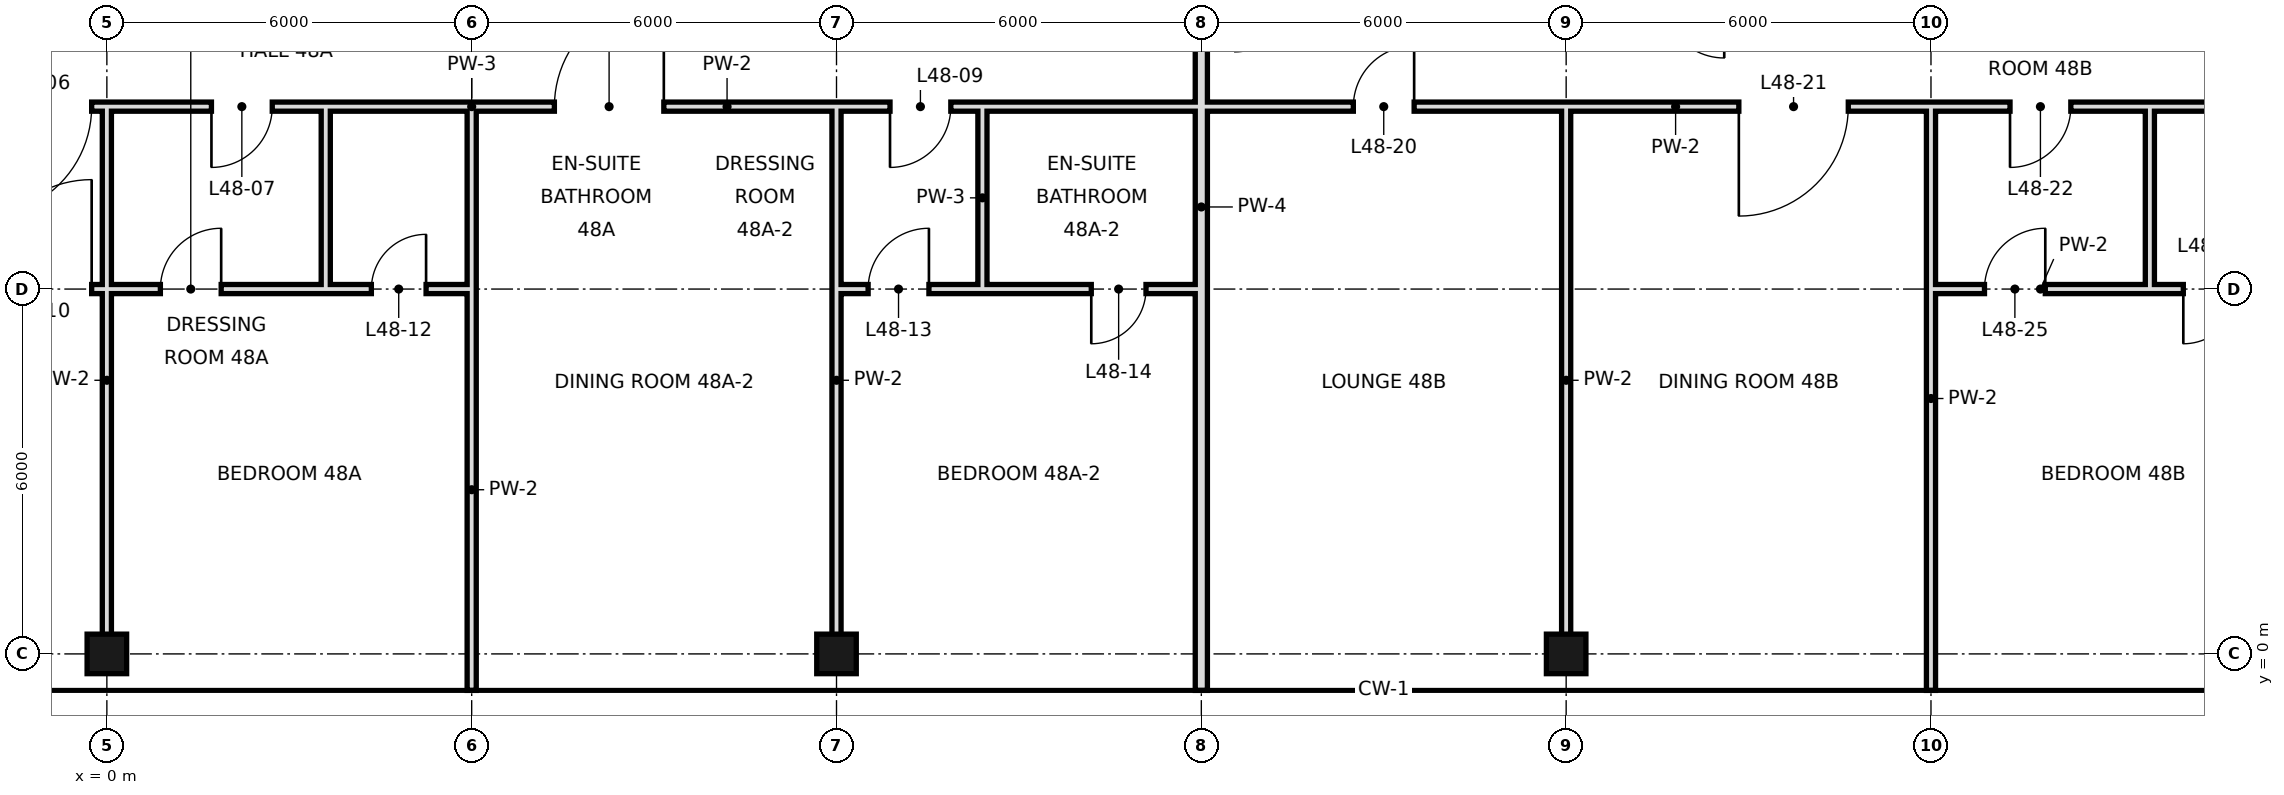
"""IFC4 building model, lengths in metres.
Left out: names, types, materials, properties, quantities, classifications, styles, units other than length and angle.
Written with IfcOpenShell. Run it as: python <this file> out.ifc"""

import sys

from ifc_helpers import new_model, si_unit, direction, frame, frame_2d, origin, origin_2d, place, context, subcontext, project, spatial, rectangle, hollow_rectangle, extrude, element, fill, save


model = new_model("IFC4")
c1 = context("Model", 3, precision=1e-05, world=origin(), true_north=direction((0.0, 1.0)))
c2 = subcontext(c1, "Body", "Model", "MODEL_VIEW")
j1 = project(units=[si_unit("LENGTHUNIT", "METRE"), si_unit("PLANEANGLEUNIT", "RADIAN")], contexts=[c1])
p1 = place(None, origin())
s1 = spatial("IfcSite", under=j1, at=p1, CompositionType="ELEMENT")
p2 = place(p1, origin())
s2 = spatial("IfcBuilding", under=s1, at=p2, CompositionType="ELEMENT")
p3 = place(p2, frame((0.0, 0.0, 206.4)))
s3 = spatial("IfcBuildingStorey", under=s2, at=p3, CompositionType="ELEMENT", Elevation=206.4)
for number, where, z_axis, x_axis in (
    (1, (0.0, 0.0, 0.0), (0.0, 0.0, 1.0), (1.0, 0.0, 0.0)),
    (2, (12.0, 0.0, 0.0), (0.0, 0.0, 1.0), (1.0, 0.0, 0.0)),
    (3, (24.0, 0.0, 0.0), (0.0, 0.0, 1.0), (1.0, 0.0, 0.0)),
):
    element("IfcColumn", number, at=place(p3, frame(where, z_axis=z_axis, x_axis=x_axis)), inside=s3, PredefinedType="COLUMN", context=c2, shape_type="SweptSolid", body=[
        extrude(hollow_rectangle(XDim=0.65, YDim=0.65, WallThickness=0.032, at=origin_2d()), origin(), (0.0, 0.0, 1.0), 3.6),
    ])
for number, where, z_axis, x_axis in (
    (4, (0.0, 0.0, 0.0), (0.0, 0.0, 1.0), (0.0, 1.0, 0.0)),
    (5, (12.0, 0.0, 0.0), (0.0, 0.0, 1.0), (0.0, 1.0, 0.0)),
):
    element("IfcWall", number, at=place(p3, frame(where, z_axis=z_axis, x_axis=x_axis)), inside=s3, PredefinedType="PARTITIONING", context=c2, shape_type="SweptSolid", body=[
        extrude(rectangle(XDim=9.0, YDim=0.15, at=frame_2d((4.5, 0.0))), origin(), (0.0, 0.0, 1.0), 2.68),
    ])
p4 = place(p3, frame((14.4, 6.0, 0.0), z_axis=(0.0, 0.0, 1.0), x_axis=(0.0, 1.0, 0.0)))
e6 = element("IfcWall", 6, at=p4, inside=s3, PredefinedType="PARTITIONING", context=c2, shape_type="SweptSolid", body=[
    extrude(rectangle(XDim=3.0, YDim=0.15, at=frame_2d((1.5, 0.0))), origin(), (0.0, 0.0, 1.0), 3.38),
])
p5 = place(p3, frame((18.0, -0.6, 0.0), z_axis=(0.0, 0.0, 1.0), x_axis=(0.0, 1.0, 0.0)))
e7 = element("IfcWall", 7, at=p5, inside=s3, PredefinedType="SOLIDWALL", context=c2, shape_type="SweptSolid", body=[
    extrude(rectangle(XDim=15.9, YDim=0.2, at=frame_2d((7.95, 0.0))), origin(), (0.0, 0.0, 1.0), 2.68),
])
p6 = place(p3, frame((24.0, 0.0, 0.0), z_axis=(0.0, 0.0, 1.0), x_axis=(0.0, 1.0, 0.0)))
e8 = element("IfcWall", 8, at=p6, inside=s3, PredefinedType="PARTITIONING", context=c2, shape_type="SweptSolid", body=[
    extrude(rectangle(XDim=9.0, YDim=0.15, at=frame_2d((4.5, 0.0))), origin(), (0.0, 0.0, 1.0), 2.68),
])
p7 = place(p3, frame((3.6, 6.0, 0.0), z_axis=(0.0, 0.0, 1.0), x_axis=(0.0, 1.0, 0.0)))
e9 = element("IfcWall", 9, at=p7, inside=s3, PredefinedType="PARTITIONING", context=c2, shape_type="SweptSolid", body=[
    extrude(rectangle(XDim=3.0, YDim=0.15, at=frame_2d((1.5, 0.0))), origin(), (0.0, 0.0, 1.0), 3.38),
])
p8 = place(p3, frame((30.0, -0.6, 0.0), z_axis=(0.0, 0.0, 1.0), x_axis=(0.0, 1.0, 0.0)))
e10 = element("IfcWall", 10, at=p8, inside=s3, PredefinedType="PARTITIONING", context=c2, shape_type="SweptSolid", body=[
    extrude(rectangle(XDim=9.6, YDim=0.15, at=frame_2d((4.8, 0.0))), origin(), (0.0, 0.0, 1.0), 2.68),
])
p9 = place(p3, frame((33.6, 6.0, 0.0), z_axis=(0.0, 0.0, 1.0), x_axis=(0.0, 1.0, 0.0)))
e11 = element("IfcWall", 11, at=p9, inside=s3, PredefinedType="PARTITIONING", context=c2, shape_type="SweptSolid", body=[
    extrude(rectangle(XDim=3.0, YDim=0.15, at=frame_2d((1.5, 0.0))), origin(), (0.0, 0.0, 1.0), 3.38),
])
p10 = place(p3, frame((6.0, -0.6, 0.0), z_axis=(0.0, 0.0, 1.0), x_axis=(0.0, 1.0, 0.0)))
e12 = element("IfcWall", 12, at=p10, inside=s3, PredefinedType="PARTITIONING", context=c2, shape_type="SweptSolid", body=[
    extrude(rectangle(XDim=6.6, YDim=0.15, at=frame_2d((3.3, 0.0))), origin(), (0.0, 0.0, 1.0), 2.68),
])
p11 = place(p3, frame((6.0, 6.0, 0.0), z_axis=(0.0, 0.0, 1.0), x_axis=(0.0, 1.0, 0.0)))
e13 = element("IfcWall", 13, at=p11, inside=s3, PredefinedType="PARTITIONING", context=c2, shape_type="SweptSolid", body=[
    extrude(rectangle(XDim=3.0, YDim=0.15, at=frame_2d((1.5, 0.0))), origin(), (0.0, 0.0, 1.0), 2.68),
])
p12 = place(p3, frame((-12.0, 6.0, 0.0), z_axis=(0.0, 0.0, 1.0), x_axis=(1.0, 0.0, 0.0)))
e14 = element("IfcWall", 14, at=p12, inside=s3, PredefinedType="PARTITIONING", context=c2, shape_type="SweptSolid", body=[
    extrude(rectangle(XDim=15.6, YDim=0.15, at=frame_2d((7.8, 0.0))), origin(), (0.0, 0.0, 1.0), 2.68),
])
p13 = place(p12, frame((9.95, 0.0, 0.0)))
e15 = element("IfcOpeningElement", 15, at=p13, cuts=e14, PredefinedType="OPENING", context=c2, shape_type="SweptSolid", body=[
    extrude(rectangle(XDim=1.8, YDim=2.4, at=frame_2d((0.9, 1.2))), frame((0.0, 0.085, 0.0), z_axis=(0.0, -1.0, 0.0), x_axis=(1.0, 0.0, 0.0)), (0.0, 0.0, 1.0), 0.17),
])
p14 = place(p12, frame((12.88, 0.0, 0.0)))
e16 = element("IfcOpeningElement", 16, at=p14, cuts=e14, PredefinedType="OPENING", context=c2, shape_type="SweptSolid", body=[
    extrude(rectangle(XDim=1.0, YDim=2.4, at=frame_2d((0.5, 1.2))), frame((0.0, 0.085, 0.0), z_axis=(0.0, -1.0, 0.0), x_axis=(1.0, 0.0, 0.0)), (0.0, 0.0, 1.0), 0.17),
])
p15 = place(p3, frame((12.0, 6.0, 0.0), z_axis=(0.0, 0.0, 1.0), x_axis=(1.0, 0.0, 0.0)))
e17 = element("IfcWall", 17, at=p15, inside=s3, PredefinedType="PARTITIONING", context=c2, shape_type="SweptSolid", body=[
    extrude(rectangle(XDim=2.4, YDim=0.15, at=frame_2d((1.2, 0.0))), origin(), (0.0, 0.0, 1.0), 2.93),
])
p16 = place(p15, frame((0.52, 0.0, 0.0)))
e18 = element("IfcOpeningElement", 18, at=p16, cuts=e17, PredefinedType="OPENING", context=c2, shape_type="SweptSolid", body=[
    extrude(rectangle(XDim=1.0, YDim=2.4, at=frame_2d((0.5, 1.2))), frame((0.0, 0.085, 0.0), z_axis=(0.0, -1.0, 0.0), x_axis=(1.0, 0.0, 0.0)), (0.0, 0.0, 1.0), 0.17),
])
p17 = place(p3, frame((30.0, 6.0, 0.0), z_axis=(0.0, 0.0, 1.0), x_axis=(1.0, 0.0, 0.0)))
e19 = element("IfcWall", 19, at=p17, inside=s3, PredefinedType="PARTITIONING", context=c2, shape_type="SweptSolid", body=[
    extrude(rectangle(XDim=3.6, YDim=0.15, at=frame_2d((1.8, 0.0))), origin(), (0.0, 0.0, 1.0), 2.93),
])
p18 = place(p17, frame((0.88, 0.0, 0.0)))
e20 = element("IfcOpeningElement", 20, at=p18, cuts=e19, PredefinedType="OPENING", context=c2, shape_type="SweptSolid", body=[
    extrude(rectangle(XDim=1.0, YDim=2.4, at=frame_2d((0.5, 1.2))), frame((0.0, 0.085, 0.0), z_axis=(0.0, -1.0, 0.0), x_axis=(1.0, 0.0, 0.0)), (0.0, 0.0, 1.0), 0.17),
])
p19 = place(p3, frame((3.6, 6.0, 0.0), z_axis=(0.0, 0.0, 1.0), x_axis=(1.0, 0.0, 0.0)))
e21 = element("IfcWall", 21, at=p19, inside=s3, PredefinedType="PARTITIONING", context=c2, shape_type="SweptSolid", body=[
    extrude(rectangle(XDim=2.4, YDim=0.15, at=frame_2d((1.2, 0.0))), origin(), (0.0, 0.0, 1.0), 2.93),
])
p20 = place(p19, frame((0.75, 0.0, 0.0)))
e22 = element("IfcOpeningElement", 22, at=p20, cuts=e21, PredefinedType="OPENING", context=c2, shape_type="SweptSolid", body=[
    extrude(rectangle(XDim=0.9, YDim=2.4, at=frame_2d((0.45, 1.2))), frame((0.0, 0.085, 0.0), z_axis=(0.0, -1.0, 0.0), x_axis=(1.0, 0.0, 0.0)), (0.0, 0.0, 1.0), 0.17),
])
p21 = place(p3, frame((14.4, 6.0, 0.0), z_axis=(0.0, 0.0, 1.0), x_axis=(1.0, 0.0, 0.0)))
e23 = element("IfcWall", 23, at=p21, inside=s3, PredefinedType="PARTITIONING", context=c2, shape_type="SweptSolid", body=[
    extrude(rectangle(XDim=3.6, YDim=0.15, at=frame_2d((1.8, 0.0))), origin(), (0.0, 0.0, 1.0), 2.93),
])
p22 = place(p21, frame((1.79, 0.0, 0.0)))
e24 = element("IfcOpeningElement", 24, at=p22, cuts=e23, PredefinedType="OPENING", context=c2, shape_type="SweptSolid", body=[
    extrude(rectangle(XDim=0.9, YDim=2.4, at=frame_2d((0.45, 1.2))), frame((0.0, 0.085, 0.0), z_axis=(0.0, -1.0, 0.0), x_axis=(1.0, 0.0, 0.0)), (0.0, 0.0, 1.0), 0.17),
])
p23 = place(p3, frame((33.6, 6.0, 0.0), z_axis=(0.0, 0.0, 1.0), x_axis=(1.0, 0.0, 0.0)))
e25 = element("IfcWall", 25, at=p23, inside=s3, PredefinedType="PARTITIONING", context=c2, shape_type="SweptSolid", body=[
    extrude(rectangle(XDim=6.0, YDim=0.15, at=frame_2d((3.0, 0.0))), origin(), (0.0, 0.0, 1.0), 2.93),
])
p24 = place(p23, frame((0.55, 0.0, 0.0)))
e26 = element("IfcOpeningElement", 26, at=p24, cuts=e25, PredefinedType="OPENING", context=c2, shape_type="SweptSolid", body=[
    extrude(rectangle(XDim=0.9, YDim=2.4, at=frame_2d((0.45, 1.2))), frame((0.0, 0.085, 0.0), z_axis=(0.0, -1.0, 0.0), x_axis=(1.0, 0.0, 0.0)), (0.0, 0.0, 1.0), 0.17),
])
p25 = place(p23, frame((3.31, 0.0, 0.0)))
e27 = element("IfcOpeningElement", 27, at=p25, cuts=e25, PredefinedType="OPENING", context=c2, shape_type="SweptSolid", body=[
    extrude(rectangle(XDim=0.9, YDim=2.4, at=frame_2d((0.45, 1.2))), frame((0.0, 0.085, 0.0), z_axis=(0.0, -1.0, 0.0), x_axis=(1.0, 0.0, 0.0)), (0.0, 0.0, 1.0), 0.17),
])
p26 = place(p3, frame((-12.6, 9.0, 0.0), z_axis=(0.0, 0.0, 1.0), x_axis=(1.0, 0.0, 0.0)))
e28 = element("IfcWall", 28, at=p26, inside=s3, PredefinedType="PARTITIONING", context=c2, shape_type="SweptSolid", body=[
    extrude(rectangle(XDim=16.2, YDim=0.15, at=frame_2d((8.1, 0.0))), origin(), (0.0, 0.0, 1.0), 3.38),
])
p27 = place(p26, frame((10.55, 0.0, 0.0)))
e29 = element("IfcOpeningElement", 29, at=p27, cuts=e28, PredefinedType="OPENING", context=c2, shape_type="SweptSolid", body=[
    extrude(rectangle(XDim=1.8, YDim=2.4, at=frame_2d((0.9, 1.2))), frame((0.0, 0.085, 0.0), z_axis=(0.0, -1.0, 0.0), x_axis=(1.0, 0.0, 0.0)), (0.0, 0.0, 1.0), 0.17),
])
p28 = place(p26, frame((14.32, 0.0, 0.0)))
e30 = element("IfcOpeningElement", 30, at=p28, cuts=e28, PredefinedType="OPENING", context=c2, shape_type="SweptSolid", body=[
    extrude(rectangle(XDim=1.0, YDim=2.4, at=frame_2d((0.5, 1.2))), frame((0.0, 0.085, 0.0), z_axis=(0.0, -1.0, 0.0), x_axis=(1.0, 0.0, 0.0)), (0.0, 0.0, 1.0), 0.17),
])
p29 = place(p3, frame((6.0, 9.0, 0.0), z_axis=(0.0, 0.0, 1.0), x_axis=(1.0, 0.0, 0.0)))
e31 = element("IfcWall", 31, at=p29, inside=s3, PredefinedType="PARTITIONING", context=c2, shape_type="SweptSolid", body=[
    extrude(rectangle(XDim=8.4, YDim=0.15, at=frame_2d((4.2, 0.0))), origin(), (0.0, 0.0, 1.0), 3.38),
])
p30 = place(p29, frame((1.36, 0.0, 0.0)))
e32 = element("IfcOpeningElement", 32, at=p30, cuts=e31, PredefinedType="OPENING", context=c2, shape_type="SweptSolid", body=[
    extrude(rectangle(XDim=1.8, YDim=2.4, at=frame_2d((0.9, 1.2))), frame((0.0, 0.085, 0.0), z_axis=(0.0, -1.0, 0.0), x_axis=(1.0, 0.0, 0.0)), (0.0, 0.0, 1.0), 0.17),
])
p31 = place(p29, frame((6.88, 0.0, 0.0)))
e33 = element("IfcOpeningElement", 33, at=p31, cuts=e31, PredefinedType="OPENING", context=c2, shape_type="SweptSolid", body=[
    extrude(rectangle(XDim=1.0, YDim=2.4, at=frame_2d((0.5, 1.2))), frame((0.0, 0.085, 0.0), z_axis=(0.0, -1.0, 0.0), x_axis=(1.0, 0.0, 0.0)), (0.0, 0.0, 1.0), 0.17),
])
p32 = place(p3, frame((18.0, 9.0, 0.0), z_axis=(0.0, 0.0, 1.0), x_axis=(1.0, 0.0, 0.0)))
e34 = element("IfcWall", 34, at=p32, inside=s3, PredefinedType="PARTITIONING", context=c2, shape_type="SweptSolid", body=[
    extrude(rectangle(XDim=15.6, YDim=0.15, at=frame_2d((7.8, 0.0))), origin(), (0.0, 0.0, 1.0), 3.38),
])
p33 = place(p32, frame((2.5, 0.0, 0.0)))
e35 = element("IfcOpeningElement", 35, at=p33, cuts=e34, PredefinedType="OPENING", context=c2, shape_type="SweptSolid", body=[
    extrude(rectangle(XDim=1.0, YDim=2.4, at=frame_2d((0.5, 1.2))), frame((0.0, 0.085, 0.0), z_axis=(0.0, -1.0, 0.0), x_axis=(1.0, 0.0, 0.0)), (0.0, 0.0, 1.0), 0.17),
])
p34 = place(p32, frame((8.84, 0.0, 0.0)))
e36 = element("IfcOpeningElement", 36, at=p34, cuts=e34, PredefinedType="OPENING", context=c2, shape_type="SweptSolid", body=[
    extrude(rectangle(XDim=1.8, YDim=2.4, at=frame_2d((0.9, 1.2))), frame((0.0, 0.085, 0.0), z_axis=(0.0, -1.0, 0.0), x_axis=(1.0, 0.0, 0.0)), (0.0, 0.0, 1.0), 0.17),
])
p35 = place(p32, frame((13.3, 0.0, 0.0)))
e37 = element("IfcOpeningElement", 37, at=p35, cuts=e34, PredefinedType="OPENING", context=c2, shape_type="SweptSolid", body=[
    extrude(rectangle(XDim=1.0, YDim=2.4, at=frame_2d((0.5, 1.2))), frame((0.0, 0.085, 0.0), z_axis=(0.0, -1.0, 0.0), x_axis=(1.0, 0.0, 0.0)), (0.0, 0.0, 1.0), 0.17),
])
p36 = place(p3, frame((3.6, 9.0, 0.0), z_axis=(0.0, 0.0, 1.0), x_axis=(1.0, 0.0, 0.0)))
e38 = element("IfcWall", 38, at=p36, inside=s3, PredefinedType="PARTITIONING", context=c2, shape_type="SweptSolid", body=[
    extrude(rectangle(XDim=2.4, YDim=0.15, at=frame_2d((1.2, 0.0))), origin(), (0.0, 0.0, 1.0), 3.38),
])
p37 = place(p3, frame((14.4, 9.0, 0.0), z_axis=(0.0, 0.0, 1.0), x_axis=(1.0, 0.0, 0.0)))
e39 = element("IfcWall", 39, at=p37, inside=s3, PredefinedType="PARTITIONING", context=c2, shape_type="SweptSolid", body=[
    extrude(rectangle(XDim=3.6, YDim=0.15, at=frame_2d((1.8, 0.0))), origin(), (0.0, 0.0, 1.0), 3.38),
])
p38 = place(p3, frame((33.6, 9.0, 0.0), z_axis=(0.0, 0.0, 1.0), x_axis=(1.0, 0.0, 0.0)))
e40 = element("IfcWall", 40, at=p38, inside=s3, PredefinedType="PARTITIONING", context=c2, shape_type="SweptSolid", body=[
    extrude(rectangle(XDim=6.0, YDim=0.15, at=frame_2d((3.0, 0.0))), origin(), (0.0, 0.0, 1.0), 3.38),
])
p39 = place(p27, frame((1.8, 0.0, 0.0), z_axis=(0.0, 0.0, 1.0), x_axis=(-1.0, 0.0, 0.0)))
e41 = element("IfcDoor", 41, at=p39, inside=s3, OperationType="SINGLE_SWING_RIGHT", PredefinedType="DOOR", context=c2, shape_type="SweptSolid", body=[
    extrude(rectangle(XDim=1.8, YDim=2.4, at=frame_2d((0.9, 1.2))), frame((0.0, 0.025, 0.0), z_axis=(0.0, -1.0, 0.0), x_axis=(1.0, 0.0, 0.0)), (0.0, 0.0, 1.0), 0.05),
])
fill(e29, e41)
p40 = place(p28, frame((1.0, 0.0, 0.0), z_axis=(0.0, 0.0, 1.0), x_axis=(-1.0, 0.0, 0.0)))
e42 = element("IfcDoor", 42, at=p40, inside=s3, OperationType="SINGLE_SWING_RIGHT", PredefinedType="DOOR", context=c2, shape_type="SweptSolid", body=[
    extrude(rectangle(XDim=1.0, YDim=2.4, at=frame_2d((0.5, 1.2))), frame((0.0, 0.025, 0.0), z_axis=(0.0, -1.0, 0.0), x_axis=(1.0, 0.0, 0.0)), (0.0, 0.0, 1.0), 0.05),
])
fill(e30, e42)
p41 = place(p30, frame((1.8, 0.0, 0.0), z_axis=(0.0, 0.0, 1.0), x_axis=(-1.0, 0.0, 0.0)))
e43 = element("IfcDoor", 43, at=p41, inside=s3, OperationType="SINGLE_SWING_LEFT", PredefinedType="DOOR", context=c2, shape_type="SweptSolid", body=[
    extrude(rectangle(XDim=1.8, YDim=2.4, at=frame_2d((0.9, 1.2))), frame((0.0, 0.025, 0.0), z_axis=(0.0, -1.0, 0.0), x_axis=(1.0, 0.0, 0.0)), (0.0, 0.0, 1.0), 0.05),
])
fill(e32, e43)
p42 = place(p31, frame((1.0, 0.0, 0.0), z_axis=(0.0, 0.0, 1.0), x_axis=(-1.0, 0.0, 0.0)))
e44 = element("IfcDoor", 44, at=p42, inside=s3, OperationType="SINGLE_SWING_RIGHT", PredefinedType="DOOR", context=c2, shape_type="SweptSolid", body=[
    extrude(rectangle(XDim=1.0, YDim=2.4, at=frame_2d((0.5, 1.2))), frame((0.0, 0.025, 0.0), z_axis=(0.0, -1.0, 0.0), x_axis=(1.0, 0.0, 0.0)), (0.0, 0.0, 1.0), 0.05),
])
fill(e33, e44)
p43 = place(p13, frame((1.8, 0.0, 0.0), z_axis=(0.0, 0.0, 1.0), x_axis=(-1.0, 0.0, 0.0)))
e45 = element("IfcDoor", 45, at=p43, inside=s3, OperationType="SINGLE_SWING_LEFT", PredefinedType="DOOR", context=c2, shape_type="SweptSolid", body=[
    extrude(rectangle(XDim=1.8, YDim=2.4, at=frame_2d((0.9, 1.2))), frame((0.0, 0.025, 0.0), z_axis=(0.0, -1.0, 0.0), x_axis=(1.0, 0.0, 0.0)), (0.0, 0.0, 1.0), 0.05),
])
fill(e15, e45)
p44 = place(p14, frame((1.0, 0.0, 0.0), z_axis=(0.0, 0.0, 1.0), x_axis=(-1.0, 0.0, 0.0)))
e46 = element("IfcDoor", 46, at=p44, inside=s3, OperationType="SINGLE_SWING_LEFT", PredefinedType="DOOR", context=c2, shape_type="SweptSolid", body=[
    extrude(rectangle(XDim=1.0, YDim=2.4, at=frame_2d((0.5, 1.2))), frame((0.0, 0.025, 0.0), z_axis=(0.0, -1.0, 0.0), x_axis=(1.0, 0.0, 0.0)), (0.0, 0.0, 1.0), 0.05),
])
fill(e16, e46)
p45 = place(p20, frame((0.9, 0.0, 0.0), z_axis=(0.0, 0.0, 1.0), x_axis=(-1.0, 0.0, 0.0)))
e47 = element("IfcDoor", 47, at=p45, inside=s3, OperationType="SINGLE_SWING_LEFT", PredefinedType="DOOR", context=c2, shape_type="SweptSolid", body=[
    extrude(rectangle(XDim=0.9, YDim=2.4, at=frame_2d((0.45, 1.2))), frame((0.0, 0.025, 0.0), z_axis=(0.0, -1.0, 0.0), x_axis=(1.0, 0.0, 0.0)), (0.0, 0.0, 1.0), 0.05),
])
fill(e22, e47)
p46 = place(p16, frame((1.0, 0.0, 0.0), z_axis=(0.0, 0.0, 1.0), x_axis=(-1.0, 0.0, 0.0)))
e48 = element("IfcDoor", 48, at=p46, inside=s3, OperationType="SINGLE_SWING_LEFT", PredefinedType="DOOR", context=c2, shape_type="SweptSolid", body=[
    extrude(rectangle(XDim=1.0, YDim=2.4, at=frame_2d((0.5, 1.2))), frame((0.0, 0.025, 0.0), z_axis=(0.0, -1.0, 0.0), x_axis=(1.0, 0.0, 0.0)), (0.0, 0.0, 1.0), 0.05),
])
fill(e18, e48)
p47 = place(p22, frame((0.9, 0.0, 0.0), z_axis=(0.0, 0.0, 1.0), x_axis=(-1.0, 0.0, 0.0)))
e49 = element("IfcDoor", 49, at=p47, inside=s3, OperationType="SINGLE_SWING_RIGHT", PredefinedType="DOOR", context=c2, shape_type="SweptSolid", body=[
    extrude(rectangle(XDim=0.9, YDim=2.4, at=frame_2d((0.45, 1.2))), frame((0.0, 0.025, 0.0), z_axis=(0.0, -1.0, 0.0), x_axis=(1.0, 0.0, 0.0)), (0.0, 0.0, 1.0), 0.05),
])
fill(e24, e49)
p48 = place(p33, frame((1.0, 0.0, 0.0), z_axis=(0.0, 0.0, 1.0), x_axis=(-1.0, 0.0, 0.0)))
e50 = element("IfcDoor", 50, at=p48, inside=s3, OperationType="SINGLE_SWING_LEFT", PredefinedType="DOOR", context=c2, shape_type="SweptSolid", body=[
    extrude(rectangle(XDim=1.0, YDim=2.4, at=frame_2d((0.5, 1.2))), frame((0.0, 0.025, 0.0), z_axis=(0.0, -1.0, 0.0), x_axis=(1.0, 0.0, 0.0)), (0.0, 0.0, 1.0), 0.05),
])
fill(e35, e50)
p49 = place(p34, frame((1.8, 0.0, 0.0), z_axis=(0.0, 0.0, 1.0), x_axis=(-1.0, 0.0, 0.0)))
e51 = element("IfcDoor", 51, at=p49, inside=s3, OperationType="SINGLE_SWING_RIGHT", PredefinedType="DOOR", context=c2, shape_type="SweptSolid", body=[
    extrude(rectangle(XDim=1.8, YDim=2.4, at=frame_2d((0.9, 1.2))), frame((0.0, 0.025, 0.0), z_axis=(0.0, -1.0, 0.0), x_axis=(1.0, 0.0, 0.0)), (0.0, 0.0, 1.0), 0.05),
])
fill(e36, e51)
p50 = place(p35, frame((1.0, 0.0, 0.0), z_axis=(0.0, 0.0, 1.0), x_axis=(-1.0, 0.0, 0.0)))
e52 = element("IfcDoor", 52, at=p50, inside=s3, OperationType="SINGLE_SWING_RIGHT", PredefinedType="DOOR", context=c2, shape_type="SweptSolid", body=[
    extrude(rectangle(XDim=1.0, YDim=2.4, at=frame_2d((0.5, 1.2))), frame((0.0, 0.025, 0.0), z_axis=(0.0, -1.0, 0.0), x_axis=(1.0, 0.0, 0.0)), (0.0, 0.0, 1.0), 0.05),
])
fill(e37, e52)
p51 = place(p18, frame((1.0, 0.0, 0.0), z_axis=(0.0, 0.0, 1.0), x_axis=(-1.0, 0.0, 0.0)))
e53 = element("IfcDoor", 53, at=p51, inside=s3, OperationType="SINGLE_SWING_LEFT", PredefinedType="DOOR", context=c2, shape_type="SweptSolid", body=[
    extrude(rectangle(XDim=1.0, YDim=2.4, at=frame_2d((0.5, 1.2))), frame((0.0, 0.025, 0.0), z_axis=(0.0, -1.0, 0.0), x_axis=(1.0, 0.0, 0.0)), (0.0, 0.0, 1.0), 0.05),
])
fill(e20, e53)
p52 = place(p24, frame((0.9, 0.0, 0.0), z_axis=(0.0, 0.0, 1.0), x_axis=(-1.0, 0.0, 0.0)))
e54 = element("IfcDoor", 54, at=p52, inside=s3, OperationType="SINGLE_SWING_RIGHT", PredefinedType="DOOR", context=c2, shape_type="SweptSolid", body=[
    extrude(rectangle(XDim=0.9, YDim=2.4, at=frame_2d((0.45, 1.2))), frame((0.0, 0.025, 0.0), z_axis=(0.0, -1.0, 0.0), x_axis=(1.0, 0.0, 0.0)), (0.0, 0.0, 1.0), 0.05),
])
fill(e26, e54)
save(model, sys.argv[1])
